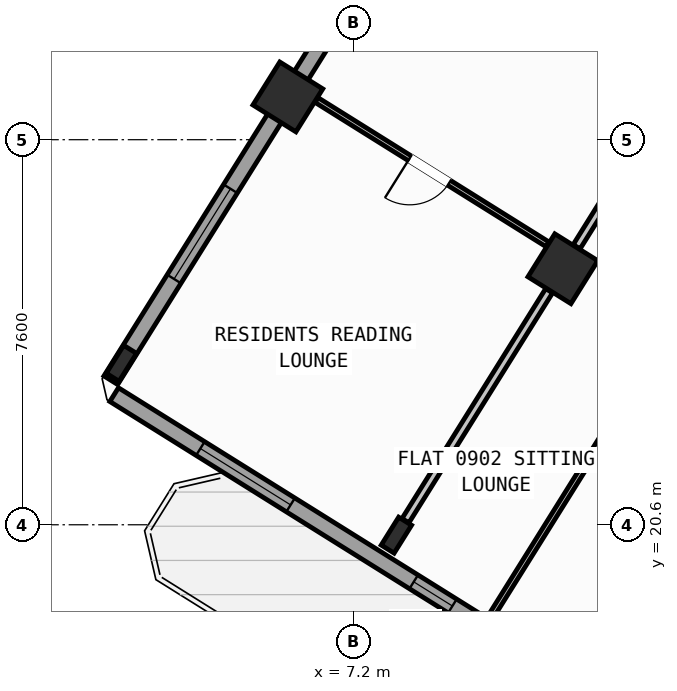
"""IFC4 building model, lengths in metres.
Left out: names, types, materials, properties, quantities, classifications, styles, units other than length and angle.
Written with IfcOpenShell. Run it as: python <this file> out.ifc"""

import sys

from ifc_helpers import new_model, si_unit, direction, frame, frame_2d, origin, origin_2d, place, context, subcontext, project, spatial, rectangle, hollow_rectangle, i_section, extrude, source, transform, mapped, element, fill, save


model = new_model("IFC4")
c1 = context("Model", 3, precision=1e-05, world=origin(), true_north=direction((0.0, 1.0)))
c2 = subcontext(c1, "Body", "Model", "MODEL_VIEW")
j1 = project(units=[si_unit("LENGTHUNIT", "METRE"), si_unit("PLANEANGLEUNIT", "RADIAN")], contexts=[c1])
p1 = place(None, origin())
s1 = spatial("IfcSite", under=j1, at=p1, CompositionType="ELEMENT")
p2 = place(p1, origin())
s2 = spatial("IfcBuilding", under=s1, at=p2, CompositionType="ELEMENT")
p3 = place(p2, frame((0.0, 0.0, 38.4)))
s3 = spatial("IfcBuildingStorey", under=s2, at=p3, CompositionType="ELEMENT", Elevation=38.4)
m1 = source(origin(), c2, "Body", "SweptSolid", [
    extrude(hollow_rectangle(XDim=1.0, YDim=1.0, WallThickness=0.04, at=origin_2d()), origin(), (0.0, 0.0, 1.0), 3.6),
])
p4 = place(p3, frame((11.336, 25.653, 0.0), z_axis=(0.0, 0.0, 1.0), x_axis=(-0.848048096156, 0.529919264233, 0.0)))
e1 = element("IfcColumn", 1, at=p4, inside=s3, PredefinedType="COLUMN", context=c2, shape_type="MappedRepresentation", body=[
    mapped(m1, transform((0.0, 0.0, 0.0), scale=1.0)),
])
m2 = source(origin(), c2, "Body", "SweptSolid", [
    extrude(i_section(OverallWidth=0.3, OverallDepth=0.65, WebThickness=0.016, FlangeThickness=0.031, at=origin_2d()), origin(), (0.0, 0.0, 1.0), 3.6),
])
p5 = place(p3, frame((8.051, 20.395, 0.0), z_axis=(0.0, 0.0, 1.0), x_axis=(-0.848048096156, 0.529919264233, 0.0)))
e2 = element("IfcColumn", 2, at=p5, inside=s3, PredefinedType="COLUMN", context=c2, shape_type="MappedRepresentation", body=[
    mapped(m2, transform((0.0, 0.0, 0.0), scale=1.0)),
])
p6 = place(p3, frame((5.909, 29.044, 0.0), z_axis=(0.0, 0.0, 1.0), x_axis=(-0.848048096156, 0.529919264233, 0.0)))
e3 = element("IfcColumn", 3, at=p6, inside=s3, PredefinedType="COLUMN", context=c2, shape_type="MappedRepresentation", body=[
    mapped(m1, transform((0.0, 0.0, 0.0), scale=1.0)),
])
p7 = place(p3, frame((2.623, 23.786, 0.0), z_axis=(0.0, 0.0, 1.0), x_axis=(-0.848048096156, 0.529919264233, 0.0)))
e4 = element("IfcColumn", 4, at=p7, inside=s3, PredefinedType="COLUMN", context=c2, shape_type="MappedRepresentation", body=[
    mapped(m2, transform((0.0, 0.0, 0.0), scale=1.0)),
])
p8 = place(p3, frame((29.268, 6.429, 0.0), z_axis=(0.0, 0.0, 1.0), x_axis=(-0.848049971435, 0.529916263149, 0.0)))
e5 = element("IfcWall", 5, at=p8, inside=s3, PredefinedType="STANDARD", context=c2, shape_type="SweptSolid", body=[
    extrude(rectangle(XDim=31.588, YDim=0.32, at=frame_2d((15.794, 0.0))), origin(), (0.0, 0.0, 1.0), 3.35),
])
p9 = place(p8, frame((16.362, 0.0, 0.0)))
e6 = element("IfcOpeningElement", 6, at=p9, cuts=e5, PredefinedType="OPENING", context=c2, shape_type="SweptSolid", body=[
    extrude(rectangle(XDim=1.2, YDim=2.15, at=frame_2d((0.6, 1.075))), frame((0.0, 0.17, 0.0), z_axis=(0.0, -1.0, 0.0), x_axis=(1.0, 0.0, 0.0)), (0.0, 0.0, 1.0), 0.34),
])
p10 = place(p8, frame((2.989, 0.0, 0.8)))
e7 = element("IfcOpeningElement", 7, at=p10, cuts=e5, PredefinedType="OPENING", context=c2, shape_type="SweptSolid", body=[
    extrude(rectangle(XDim=2.1, YDim=1.55, at=frame_2d((1.05, 0.775))), frame((0.0, 0.17, 0.0), z_axis=(0.0, -1.0, 0.0), x_axis=(1.0, 0.0, 0.0)), (0.0, 0.0, 1.0), 0.34),
])
p11 = place(p8, frame((8.359, 0.0, 0.8)))
e8 = element("IfcOpeningElement", 8, at=p11, cuts=e5, PredefinedType="OPENING", context=c2, shape_type="SweptSolid", body=[
    extrude(rectangle(XDim=2.1, YDim=1.55, at=frame_2d((1.05, 0.775))), frame((0.0, 0.17, 0.0), z_axis=(0.0, -1.0, 0.0), x_axis=(1.0, 0.0, 0.0)), (0.0, 0.0, 1.0), 0.34),
])
p12 = place(p8, frame((13.284, 0.0, 0.95)))
e9 = element("IfcOpeningElement", 9, at=p12, cuts=e5, PredefinedType="OPENING", context=c2, shape_type="SweptSolid", body=[
    extrude(rectangle(XDim=1.2, YDim=1.4, at=frame_2d((0.6, 0.7))), frame((0.0, 0.17, 0.0), z_axis=(0.0, -1.0, 0.0), x_axis=(1.0, 0.0, 0.0)), (0.0, 0.0, 1.0), 0.34),
])
p13 = place(p8, frame((20.39, 0.0, 0.95)))
e10 = element("IfcOpeningElement", 10, at=p13, cuts=e5, PredefinedType="OPENING", context=c2, shape_type="SweptSolid", body=[
    extrude(rectangle(XDim=1.2, YDim=1.4, at=frame_2d((0.6, 0.7))), frame((0.0, 0.17, 0.0), z_axis=(0.0, -1.0, 0.0), x_axis=(1.0, 0.0, 0.0)), (0.0, 0.0, 1.0), 0.34),
])
p14 = place(p8, frame((23.715, 0.0, 1.0)))
e11 = element("IfcOpeningElement", 11, at=p14, cuts=e5, PredefinedType="OPENING", context=c2, shape_type="SweptSolid", body=[
    extrude(rectangle(XDim=0.9, YDim=1.25, at=frame_2d((0.45, 0.625))), frame((0.0, 0.17, 0.0), z_axis=(0.0, -1.0, 0.0), x_axis=(1.0, 0.0, 0.0)), (0.0, 0.0, 1.0), 0.34),
])
p15 = place(p8, frame((27.481, 0.0, 0.8)))
e12 = element("IfcOpeningElement", 12, at=p15, cuts=e5, PredefinedType="OPENING", context=c2, shape_type="SweptSolid", body=[
    extrude(rectangle(XDim=2.1, YDim=1.55, at=frame_2d((1.05, 0.775))), frame((0.0, 0.17, 0.0), z_axis=(0.0, -1.0, 0.0), x_axis=(1.0, 0.0, 0.0)), (0.0, 0.0, 1.0), 0.34),
])
p16 = place(p3, frame((2.415, 23.452, 0.0), z_axis=(0.0, 0.0, 1.0), x_axis=(0.52991049553, 0.848053575387, 0.0)))
e13 = element("IfcWall", 13, at=p16, inside=s3, PredefinedType="STANDARD", context=c2, shape_type="SweptSolid", body=[
    extrude(rectangle(XDim=21.587, YDim=0.32, at=frame_2d((10.794, 0.0))), origin(), (0.0, 0.0, 1.0), 2.725),
])
p17 = place(p16, frame((2.356, 0.0, 0.8)))
e14 = element("IfcOpeningElement", 14, at=p17, cuts=e13, PredefinedType="OPENING", context=c2, shape_type="SweptSolid", body=[
    extrude(rectangle(XDim=2.1, YDim=1.55, at=frame_2d((1.05, 0.775))), frame((0.0, 0.17, 0.0), z_axis=(0.0, -1.0, 0.0), x_axis=(1.0, 0.0, 0.0)), (0.0, 0.0, 1.0), 0.34),
])
p18 = place(p16, frame((9.344, 0.0, 0.85)))
e15 = element("IfcOpeningElement", 15, at=p18, cuts=e13, PredefinedType="OPENING", context=c2, shape_type="SweptSolid", body=[
    extrude(rectangle(XDim=1.8, YDim=1.5, at=frame_2d((0.9, 0.75))), frame((0.0, 0.17, 0.0), z_axis=(0.0, -1.0, 0.0), x_axis=(1.0, 0.0, 0.0)), (0.0, 0.0, 1.0), 0.34),
])
p19 = place(p16, frame((15.154, 0.0, 0.85)))
e16 = element("IfcOpeningElement", 16, at=p19, cuts=e13, PredefinedType="OPENING", context=c2, shape_type="SweptSolid", body=[
    extrude(rectangle(XDim=1.5, YDim=1.5, at=frame_2d((0.75, 0.75))), frame((0.0, 0.17, 0.0), z_axis=(0.0, -1.0, 0.0), x_axis=(1.0, 0.0, 0.0)), (0.0, 0.0, 1.0), 0.34),
])
p20 = place(p3, frame((25.807, 29.582, 0.0), z_axis=(0.0, 0.0, 1.0), x_axis=(-0.848052408131, 0.529912363569, 0.0)))
e17 = element("IfcWall", 17, at=p20, inside=s3, PredefinedType="PARTITIONING", context=c2, shape_type="SweptSolid", body=[
    extrude(rectangle(XDim=16.73, YDim=0.16, at=frame_2d((8.365, 0.0))), origin(), (0.0, 0.0, 1.0), 3.34),
])
p21 = place(p20, frame((2.22, 0.0, 0.0)))
e18 = element("IfcOpeningElement", 18, at=p21, cuts=e17, PredefinedType="OPENING", context=c2, shape_type="SweptSolid", body=[
    extrude(rectangle(XDim=0.86, YDim=2.05, at=frame_2d((0.43, 1.025))), frame((0.0, 0.09, 0.0), z_axis=(0.0, -1.0, 0.0), x_axis=(1.0, 0.0, 0.0)), (0.0, 0.0, 1.0), 0.18),
])
p22 = place(p20, frame((7.82, 0.0, 0.0)))
e19 = element("IfcOpeningElement", 19, at=p22, cuts=e17, PredefinedType="OPENING", context=c2, shape_type="SweptSolid", body=[
    extrude(rectangle(XDim=1.0, YDim=2.1, at=frame_2d((0.5, 1.05))), frame((0.0, 0.09, 0.0), z_axis=(0.0, -1.0, 0.0), x_axis=(1.0, 0.0, 0.0)), (0.0, 0.0, 1.0), 0.18),
])
p23 = place(p20, frame((12.95, 0.0, 0.0)))
e20 = element("IfcOpeningElement", 20, at=p23, cuts=e17, PredefinedType="OPENING", context=c2, shape_type="SweptSolid", body=[
    extrude(rectangle(XDim=1.0, YDim=2.1, at=frame_2d((0.5, 1.05))), frame((0.0, 0.09, 0.0), z_axis=(0.0, -1.0, 0.0), x_axis=(1.0, 0.0, 0.0)), (0.0, 0.0, 1.0), 0.18),
])
p24 = place(p3, frame((14.933, 31.409, 0.0), z_axis=(0.0, 0.0, 1.0), x_axis=(-0.529897533635, -0.848061674554, 0.0)))
e21 = element("IfcWall", 21, at=p24, inside=s3, PredefinedType="PARTITIONING", context=c2, shape_type="SweptSolid", body=[
    extrude(rectangle(XDim=6.276, YDim=0.16, at=frame_2d((3.138, 0.0))), origin(), (0.0, 0.0, 1.0), 2.725),
])
p25 = place(p3, frame((11.065, 25.219, 0.0), z_axis=(0.0, 0.0, 1.0), x_axis=(-0.529904608059, -0.848057254175, 0.0)))
e22 = element("IfcWall", 22, at=p25, inside=s3, PredefinedType="PARTITIONING", context=c2, shape_type="SweptSolid", body=[
    extrude(rectangle(XDim=5.351, YDim=0.16, at=frame_2d((2.675, 0.0))), origin(), (0.0, 0.0, 1.0), 2.725),
])
p26 = place(p3, frame((17.861, 31.505, 0.0), z_axis=(0.0, 0.0, 1.0), x_axis=(-0.529928839727, -0.848042112649, 0.0)))
e23 = element("IfcWall", 23, at=p26, inside=s3, PredefinedType="PARTITIONING", context=c2, shape_type="SweptSolid", body=[
    extrude(rectangle(XDim=15.34, YDim=0.11, at=frame_2d((7.67, 0.0))), origin(), (0.0, 0.0, 1.0), 3.34),
])
p27 = place(p26, frame((0.35, 0.0, 0.0)))
e24 = element("IfcOpeningElement", 24, at=p27, cuts=e23, PredefinedType="OPENING", context=c2, shape_type="SweptSolid", body=[
    extrude(rectangle(XDim=0.92, YDim=2.08, at=frame_2d((0.46, 1.04))), frame((0.0, 0.065, 0.0), z_axis=(0.0, -1.0, 0.0), x_axis=(1.0, 0.0, 0.0)), (0.0, 0.0, 1.0), 0.13),
])
p28 = place(p3, frame((11.033, 26.135, 0.0), z_axis=(0.0, 0.0, 1.0), x_axis=(-0.848044224181, 0.529925460639, 0.0)))
e25 = element("IfcWall", 25, at=p28, inside=s3, PredefinedType="PARTITIONING", context=c2, shape_type="SweptSolid", body=[
    extrude(rectangle(XDim=5.376, YDim=0.11, at=frame_2d((2.688, 0.0))), origin(), (0.0, 0.0, 1.0), 2.725),
])
p29 = place(p28, frame((2.288, 0.0, 0.0)))
e26 = element("IfcOpeningElement", 26, at=p29, cuts=e25, PredefinedType="OPENING", context=c2, shape_type="SweptSolid", body=[
    extrude(rectangle(XDim=0.92, YDim=2.08, at=frame_2d((0.46, 1.04))), frame((0.0, 0.065, 0.0), z_axis=(0.0, -1.0, 0.0), x_axis=(1.0, 0.0, 0.0)), (0.0, 0.0, 1.0), 0.13),
])
m3 = source(origin(), c2, "Body", "SweptSolid", [
    extrude(rectangle(XDim=0.9, YDim=1.25, at=frame_2d((0.45, 0.625))), frame((0.0, 0.03, 0.0), z_axis=(0.0, -1.0, 0.0), x_axis=(1.0, 0.0, 0.0)), (0.0, 0.0, 1.0), 0.06),
])
p30 = place(p14, origin())
e27 = element("IfcWindow", 27, at=p30, inside=s3, PartitioningType="SINGLE_PANEL", PredefinedType="WINDOW", context=c2, shape_type="MappedRepresentation", body=[
    mapped(m3, transform((0.0, 0.0, 0.0), scale=1.0)),
])
fill(e11, e27)
m4 = source(origin(), c2, "Body", "SweptSolid", [
    extrude(rectangle(XDim=2.1, YDim=1.55, at=frame_2d((1.05, 0.775))), frame((0.0, 0.03, 0.0), z_axis=(0.0, -1.0, 0.0), x_axis=(1.0, 0.0, 0.0)), (0.0, 0.0, 1.0), 0.06),
])
p31 = place(p15, origin())
e28 = element("IfcWindow", 28, at=p31, inside=s3, PartitioningType="SINGLE_PANEL", PredefinedType="WINDOW", context=c2, shape_type="MappedRepresentation", body=[
    mapped(m4, transform((0.0, 0.0, 0.0), scale=1.0)),
])
fill(e12, e28)
p32 = place(p17, origin())
e29 = element("IfcWindow", 29, at=p32, inside=s3, PartitioningType="SINGLE_PANEL", PredefinedType="WINDOW", context=c2, shape_type="MappedRepresentation", body=[
    mapped(m4, transform((0.0, 0.0, 0.0), scale=1.0)),
])
fill(e14, e29)
m5 = source(origin(), c2, "Body", "SweptSolid", [
    extrude(rectangle(XDim=0.92, YDim=2.08, at=frame_2d((0.46, 1.04))), frame((0.0, 0.025, 0.0), z_axis=(0.0, -1.0, 0.0), x_axis=(1.0, 0.0, 0.0)), (0.0, 0.0, 1.0), 0.05),
])
p33 = place(p29, origin())
e30 = element("IfcDoor", 30, at=p33, inside=s3, OperationType="SINGLE_SWING_RIGHT", PredefinedType="DOOR", context=c2, shape_type="MappedRepresentation", body=[
    mapped(m5, transform((0.0, 0.0, 0.0), scale=1.0)),
])
fill(e26, e30)
save(model, sys.argv[1])
